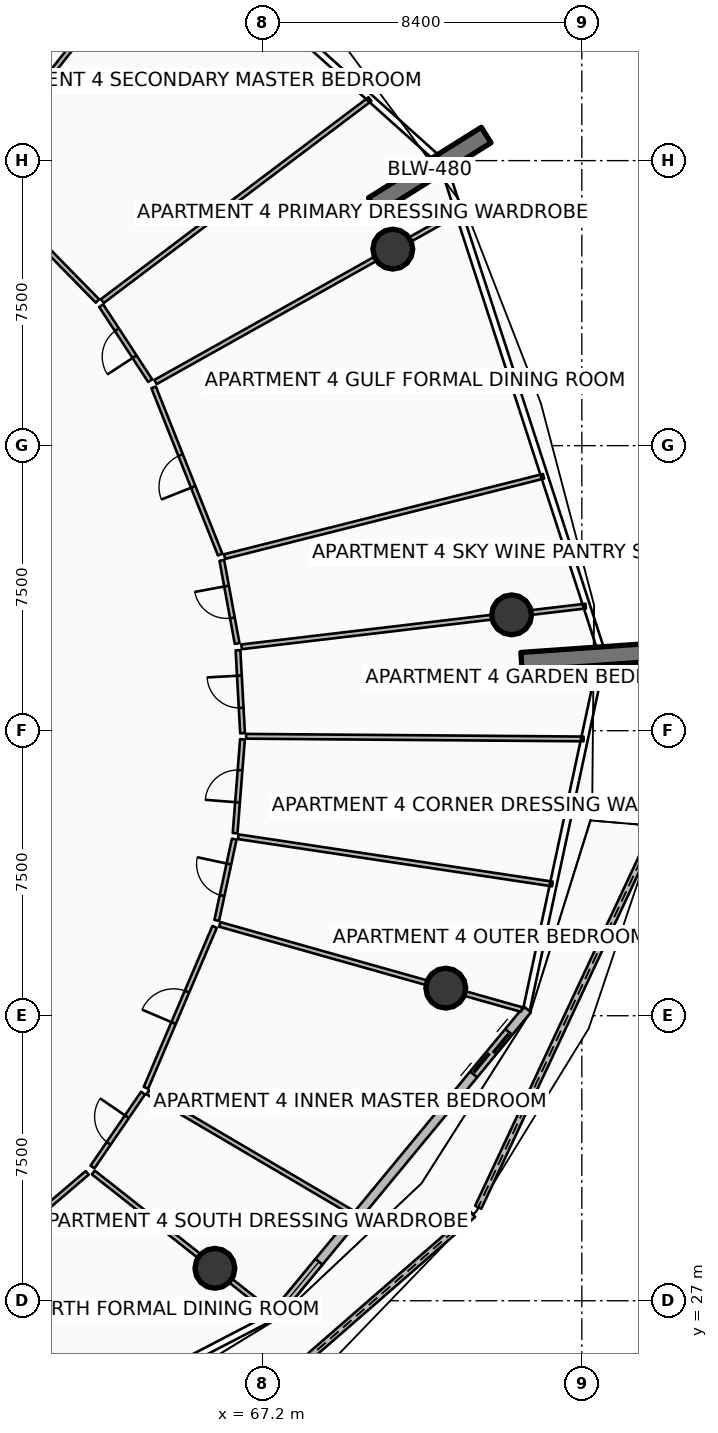
"""IFC4 building model, lengths in metres.
Left out: names, types, materials, properties, quantities, classifications, styles, units other than length and angle.
Written with IfcOpenShell. Run it as: python <this file> out.ifc"""

import sys

from ifc_helpers import new_model, si_unit, direction, frame, frame_2d, origin, origin_2d, place, context, subcontext, project, spatial, polyline, rectangle, circle, outline, extrude, element, fill, save


model = new_model("IFC4")
c1 = context("Model", 3, precision=1e-05, world=origin(), true_north=direction((0.0, 1.0)))
c2 = subcontext(c1, "Body", "Model", "MODEL_VIEW")
j1 = project(units=[si_unit("LENGTHUNIT", "METRE"), si_unit("PLANEANGLEUNIT", "RADIAN")], contexts=[c1])
p1 = place(None, origin())
s1 = spatial("IfcSite", under=j1, at=p1, CompositionType="ELEMENT")
p2 = place(p1, origin())
s2 = spatial("IfcBuilding", under=s1, at=p2, CompositionType="ELEMENT")
p3 = place(p2, frame((0.0, 0.0, 199.05)))
s3 = spatial("IfcBuildingStorey", under=s2, at=p3, CompositionType="ELEMENT", Elevation=199.05)
p4 = place(p3, frame((70.114, 55.818, 0.0), z_axis=(0.0, 0.0, 1.0), x_axis=(0.848033572426, 0.529942506352, 0.0)))
e1 = element("IfcWall", 1, at=p4, inside=s3, PredefinedType="SOLIDWALL", context=c2, shape_type="SweptSolid", body=[
    extrude(rectangle(XDim=3.5, YDim=0.48, at=frame_2d((1.75, 0.0))), origin(), (0.0, 0.0, 1.0), 3.75),
])
p5 = place(p3, frame((74.013, 43.819, 0.0), z_axis=(0.0, 0.0, 1.0), x_axis=(0.997568676264, 0.069690287244, 0.0)))
e2 = element("IfcWall", 2, at=p5, inside=s3, PredefinedType="SOLIDWALL", context=c2, shape_type="SweptSolid", body=[
    extrude(rectangle(XDim=3.5, YDim=0.48, at=frame_2d((1.75, 0.0))), origin(), (0.0, 0.0, 1.0), 3.75),
])
for number, where, z_axis, x_axis in (
    (3, (70.625, 54.671, 0.0), (0.0, 0.0, 1.0), (1.0, 0.0, 0.0)),
    (4, (65.944, 27.854, 0.0), (0.0, 0.0, 1.0), (1.0, 0.0, 0.0)),
    (5, (72.02, 35.226, 0.0), (0.0, 0.0, 1.0), (1.0, 0.0, 0.0)),
    (6, (73.752, 45.048, 0.0), (0.0, 0.0, 1.0), (1.0, 0.0, 0.0)),
):
    element("IfcColumn", number, at=place(p3, frame(where, z_axis=z_axis, x_axis=x_axis)), inside=s3, PredefinedType="COLUMN", context=c2, shape_type="SweptSolid", body=[
        extrude(circle(Radius=0.525, at=origin_2d()), origin(), (0.0, 0.0, 1.0), 3.5),
    ])
p6 = place(p3, frame((64.902, 22.454, 0.0), z_axis=(0.0, 0.0, 1.0), x_axis=(0.754130048188, 0.65672511024, 0.0)))
e7 = element("IfcWall", 7, at=p6, inside=s3, PredefinedType="PARAPET", context=c2, shape_type="SweptSolid", body=[
    extrude(outline(polyline([(0.0, 0.0), (10.384, 0.0), (10.384, 1.148), (5.192, 1.284), (0.0, 1.483), (0.0, 0.0)])), frame((0.0, 0.09, 0.0), z_axis=(0.0, -1.0, 0.0), x_axis=(1.0, 0.0, 0.0)), (0.0, 0.0, 1.0), 0.18),
])
p7 = place(p3, frame((72.874, 29.461, 0.0), z_axis=(0.0, 0.0, 1.0), x_axis=(0.424187068479, 0.90557458607, 0.0)))
e8 = element("IfcWall", 8, at=p7, inside=s3, PredefinedType="PARAPET", context=c2, shape_type="SweptSolid", body=[
    extrude(outline(polyline([(0.0, 0.0), (11.076, 0.0), (11.076, 1.224), (5.538, 1.127), (0.0, 1.148), (0.0, 0.0)])), frame((0.0, 0.09, 0.0), z_axis=(0.0, -1.0, 0.0), x_axis=(1.0, 0.0, 0.0)), (0.0, 0.0, 1.0), 0.18),
])
p8 = place(p3, frame((67.485, 26.576, 0.0), z_axis=(0.0, 0.0, 1.0), x_axis=(0.636759394418, 0.771062561418, 0.0)))
e9 = element("IfcWall", 9, at=p8, inside=s3, PredefinedType="SOLIDWALL", context=c2, shape_type="SweptSolid", body=[
    extrude(rectangle(XDim=10.494, YDim=0.24, at=frame_2d((5.247, 0.0))), origin(), (0.0, 0.0, 1.0), 2.45),
])
p9 = place(p8, frame((8.274, 0.0, 0.0)))
e10 = element("IfcOpeningElement", 10, at=p9, cuts=e9, PredefinedType="OPENING", context=c2, shape_type="SweptSolid", body=[
    extrude(rectangle(XDim=1.45, YDim=2.15, at=frame_2d((0.725, 1.075))), frame((0.0, 0.13, 0.0), z_axis=(0.0, -1.0, 0.0), x_axis=(1.0, 0.0, 0.0)), (0.0, 0.0, 1.0), 0.26),
])
p10 = place(p8, frame((0.28, 0.0, 0.65)))
e11 = element("IfcOpeningElement", 11, at=p10, cuts=e9, PredefinedType="OPENING", context=c2, shape_type="SweptSolid", body=[
    extrude(rectangle(XDim=1.6, YDim=1.5, at=frame_2d((0.8, 0.75))), frame((0.0, 0.13, 0.0), z_axis=(0.0, -1.0, 0.0), x_axis=(1.0, 0.0, 0.0)), (0.0, 0.0, 1.0), 0.26),
])
p11 = place(p3, frame((57.21, 25.776, 0.0), z_axis=(0.0, 0.0, 1.0), x_axis=(0.760406375863, 0.649447567973, 0.0)))
e12 = element("IfcWall", 12, at=p11, inside=s3, PredefinedType="PARTITIONING", context=c2, shape_type="SweptSolid", body=[
    extrude(rectangle(XDim=7.067, YDim=0.125, at=frame_2d((3.534, 0.0))), origin(), (0.0, 0.0, 1.0), 2.94),
])
p12 = place(p11, frame((3.084, 0.0, 0.0)))
e13 = element("IfcOpeningElement", 13, at=p12, cuts=e12, PredefinedType="OPENING", context=c2, shape_type="SweptSolid", body=[
    extrude(rectangle(XDim=0.9, YDim=2.08, at=frame_2d((0.45, 1.04))), frame((0.0, 0.073, 0.0), z_axis=(0.0, -1.0, 0.0), x_axis=(1.0, 0.0, 0.0)), (0.0, 0.0, 1.0), 0.145),
])
p13 = place(p3, frame((62.746, 30.375, 0.0), z_axis=(0.0, 0.0, 1.0), x_axis=(0.785328774221, -0.619078925809, 0.0)))
e14 = element("IfcWall", 14, at=p13, inside=s3, PredefinedType="PARTITIONING", context=c2, shape_type="SweptSolid", body=[
    extrude(rectangle(XDim=6.05, YDim=0.125, at=frame_2d((3.025, 0.0))), origin(), (0.0, 0.0, 1.0), 2.94),
])
p14 = place(p3, frame((64.176, 32.485, 0.0), z_axis=(0.0, 0.0, 1.0), x_axis=(0.861934215158, -0.507020126563, 0.0)))
e15 = element("IfcWall", 15, at=p14, inside=s3, PredefinedType="PARTITIONING", context=c2, shape_type="SweptSolid", body=[
    extrude(rectangle(XDim=6.269, YDim=0.125, at=frame_2d((3.135, 0.0))), origin(), (0.0, 0.0, 1.0), 2.94),
])
p15 = place(p3, frame((62.724, 30.52, 0.0), z_axis=(0.0, 0.0, 1.0), x_axis=(0.564301181705, 0.825569001554, 0.0)))
e16 = element("IfcWall", 16, at=p15, inside=s3, PredefinedType="PARTITIONING", context=c2, shape_type="SweptSolid", body=[
    extrude(rectangle(XDim=2.356, YDim=0.125, at=frame_2d((1.178, 0.0))), origin(), (0.0, 0.0, 1.0), 2.94),
])
p16 = place(p15, frame((0.753, 0.0, 0.0)))
e17 = element("IfcOpeningElement", 17, at=p16, cuts=e16, PredefinedType="OPENING", context=c2, shape_type="SweptSolid", body=[
    extrude(rectangle(XDim=0.85, YDim=2.06, at=frame_2d((0.425, 1.03))), frame((0.0, 0.073, 0.0), z_axis=(0.0, -1.0, 0.0), x_axis=(1.0, 0.0, 0.0)), (0.0, 0.0, 1.0), 0.145),
])
p17 = place(p3, frame((64.13, 32.604, 0.0), z_axis=(0.0, 0.0, 1.0), x_axis=(0.392433899516, 0.919780209893, 0.0)))
e18 = element("IfcWall", 18, at=p17, inside=s3, PredefinedType="PARTITIONING", context=c2, shape_type="SweptSolid", body=[
    extrude(rectangle(XDim=4.604, YDim=0.125, at=frame_2d((2.302, 0.0))), origin(), (0.0, 0.0, 1.0), 2.94),
])
p18 = place(p17, frame((1.852, 0.0, 0.0)))
e19 = element("IfcOpeningElement", 19, at=p18, cuts=e18, PredefinedType="OPENING", context=c2, shape_type="SweptSolid", body=[
    extrude(rectangle(XDim=0.9, YDim=2.08, at=frame_2d((0.45, 1.04))), frame((0.0, 0.073, 0.0), z_axis=(0.0, -1.0, 0.0), x_axis=(1.0, 0.0, 0.0)), (0.0, 0.0, 1.0), 0.145),
])
p19 = place(p3, frame((66.072, 36.903, 0.0), z_axis=(0.0, 0.0, 1.0), x_axis=(0.9624482888, -0.271465083179, 0.0)))
e20 = element("IfcWall", 20, at=p19, inside=s3, PredefinedType="PARTITIONING", context=c2, shape_type="SweptSolid", body=[
    extrude(rectangle(XDim=8.253, YDim=0.125, at=frame_2d((4.126, 0.0))), origin(), (0.0, 0.0, 1.0), 2.94),
])
p20 = place(p3, frame((66.558, 39.21, 0.0), z_axis=(0.0, 0.0, 1.0), x_axis=(0.988887463127, -0.148666019217, 0.0)))
e21 = element("IfcWall", 21, at=p20, inside=s3, PredefinedType="PARTITIONING", context=c2, shape_type="SweptSolid", body=[
    extrude(rectangle(XDim=8.361, YDim=0.125, at=frame_2d((4.18, 0.0))), origin(), (0.0, 0.0, 1.0), 2.94),
])
p21 = place(p3, frame((66.766, 41.853, 0.0), z_axis=(0.0, 0.0, 1.0), x_axis=(0.999969292204, -0.007836749939, 0.0)))
e22 = element("IfcWall", 22, at=p21, inside=s3, PredefinedType="PARTITIONING", context=c2, shape_type="SweptSolid", body=[
    extrude(rectangle(XDim=8.879, YDim=0.125, at=frame_2d((4.439, 0.0))), origin(), (0.0, 0.0, 1.0), 2.94),
])
p22 = place(p3, frame((65.993, 37.009, 0.0), z_axis=(0.0, 0.0, 1.0), x_axis=(0.210467381842, 0.977600880309, 0.0)))
e23 = element("IfcWall", 23, at=p22, inside=s3, PredefinedType="PARTITIONING", context=c2, shape_type="SweptSolid", body=[
    extrude(rectangle(XDim=2.186, YDim=0.125, at=frame_2d((1.093, 0.0))), origin(), (0.0, 0.0, 1.0), 2.94),
])
p23 = place(p22, frame((0.668, 0.0, 0.0)))
e24 = element("IfcOpeningElement", 24, at=p23, cuts=e23, PredefinedType="OPENING", context=c2, shape_type="SweptSolid", body=[
    extrude(rectangle(XDim=0.85, YDim=2.06, at=frame_2d((0.425, 1.03))), frame((0.0, 0.073, 0.0), z_axis=(0.0, -1.0, 0.0), x_axis=(1.0, 0.0, 0.0)), (0.0, 0.0, 1.0), 0.145),
])
p24 = place(p3, frame((66.476, 39.303, 0.0), z_axis=(0.0, 0.0, 1.0), x_axis=(0.078519549514, 0.996912574073, 0.0)))
e25 = element("IfcWall", 25, at=p24, inside=s3, PredefinedType="PARTITIONING", context=c2, shape_type="SweptSolid", body=[
    extrude(rectangle(XDim=2.478, YDim=0.125, at=frame_2d((1.239, 0.0))), origin(), (0.0, 0.0, 1.0), 2.94),
])
p25 = place(p24, frame((0.814, 0.0, 0.0)))
e26 = element("IfcOpeningElement", 26, at=p25, cuts=e25, PredefinedType="OPENING", context=c2, shape_type="SweptSolid", body=[
    extrude(rectangle(XDim=0.85, YDim=2.06, at=frame_2d((0.425, 1.03))), frame((0.0, 0.073, 0.0), z_axis=(0.0, -1.0, 0.0), x_axis=(1.0, 0.0, 0.0)), (0.0, 0.0, 1.0), 0.145),
])
p26 = place(p3, frame((66.672, 41.933, 0.0), z_axis=(0.0, 0.0, 1.0), x_axis=(-0.054962664786, 0.998488410288, 0.0)))
e27 = element("IfcWall", 27, at=p26, inside=s3, PredefinedType="PARTITIONING", context=c2, shape_type="SweptSolid", body=[
    extrude(rectangle(XDim=2.186, YDim=0.125, at=frame_2d((1.093, 0.0))), origin(), (0.0, 0.0, 1.0), 2.94),
])
p27 = place(p26, frame((0.668, 0.0, 0.0)))
e28 = element("IfcOpeningElement", 28, at=p27, cuts=e27, PredefinedType="OPENING", context=c2, shape_type="SweptSolid", body=[
    extrude(rectangle(XDim=0.85, YDim=2.06, at=frame_2d((0.425, 1.03))), frame((0.0, 0.073, 0.0), z_axis=(0.0, -1.0, 0.0), x_axis=(1.0, 0.0, 0.0)), (0.0, 0.0, 1.0), 0.145),
])
p28 = place(p3, frame((66.647, 44.207, 0.0), z_axis=(0.0, 0.0, 1.0), x_axis=(0.993068115644, 0.117540281145, 0.0)))
e29 = element("IfcWall", 29, at=p28, inside=s3, PredefinedType="PARTITIONING", context=c2, shape_type="SweptSolid", body=[
    extrude(rectangle(XDim=9.118, YDim=0.125, at=frame_2d((4.559, 0.0))), origin(), (0.0, 0.0, 1.0), 2.94),
])
p29 = place(p3, frame((66.199, 46.582, 0.0), z_axis=(0.0, 0.0, 1.0), x_axis=(0.969747932206, 0.244108475851, 0.0)))
e30 = element("IfcWall", 30, at=p29, inside=s3, PredefinedType="PARTITIONING", context=c2, shape_type="SweptSolid", body=[
    extrude(rectangle(XDim=8.654, YDim=0.125, at=frame_2d((4.327, 0.0))), origin(), (0.0, 0.0, 1.0), 2.94),
])
p30 = place(p3, frame((66.529, 44.293, 0.0), z_axis=(0.0, 0.0, 1.0), x_axis=(-0.181126107814, 0.983459878728, 0.0)))
e31 = element("IfcWall", 31, at=p30, inside=s3, PredefinedType="PARTITIONING", context=c2, shape_type="SweptSolid", body=[
    extrude(rectangle(XDim=2.224, YDim=0.125, at=frame_2d((1.112, 0.0))), origin(), (0.0, 0.0, 1.0), 2.94),
])
p31 = place(p30, frame((0.687, 0.0, 0.0)))
e32 = element("IfcOpeningElement", 32, at=p31, cuts=e31, PredefinedType="OPENING", context=c2, shape_type="SweptSolid", body=[
    extrude(rectangle(XDim=0.85, YDim=2.06, at=frame_2d((0.425, 1.03))), frame((0.0, 0.073, 0.0), z_axis=(0.0, -1.0, 0.0), x_axis=(1.0, 0.0, 0.0)), (0.0, 0.0, 1.0), 0.145),
])
p32 = place(p3, frame((66.082, 46.634, 0.0), z_axis=(0.0, 0.0, 1.0), x_axis=(-0.369567399645, 0.929203926552, 0.0)))
e33 = element("IfcWall", 33, at=p32, inside=s3, PredefinedType="PARTITIONING", context=c2, shape_type="SweptSolid", body=[
    extrude(rectangle(XDim=4.735, YDim=0.125, at=frame_2d((2.367, 0.0))), origin(), (0.0, 0.0, 1.0), 2.94),
])
p33 = place(p32, frame((1.917, 0.0, 0.0)))
e34 = element("IfcOpeningElement", 34, at=p33, cuts=e33, PredefinedType="OPENING", context=c2, shape_type="SweptSolid", body=[
    extrude(rectangle(XDim=0.9, YDim=2.08, at=frame_2d((0.45, 1.04))), frame((0.0, 0.073, 0.0), z_axis=(0.0, -1.0, 0.0), x_axis=(1.0, 0.0, 0.0)), (0.0, 0.0, 1.0), 0.145),
])
p34 = place(p3, frame((64.383, 51.175, 0.0), z_axis=(0.0, 0.0, 1.0), x_axis=(0.872496427588, 0.488620490611, 0.0)))
e35 = element("IfcWall", 35, at=p34, inside=s3, PredefinedType="PARTITIONING", context=c2, shape_type="SweptSolid", body=[
    extrude(rectangle(XDim=9.118, YDim=0.125, at=frame_2d((4.559, 0.0))), origin(), (0.0, 0.0, 1.0), 2.94),
])
p35 = place(p3, frame((59.625, 56.746, 0.0), z_axis=(0.0, 0.0, 1.0), x_axis=(0.619083134383, 0.785325456561, 0.0)))
e36 = element("IfcWall", 36, at=p35, inside=s3, PredefinedType="PARTITIONING", context=c2, shape_type="SweptSolid", body=[
    extrude(rectangle(XDim=8.353, YDim=0.125, at=frame_2d((4.177, 0.0))), origin(), (0.0, 0.0, 1.0), 2.94),
])
p36 = place(p3, frame((62.981, 53.303, 0.0), z_axis=(0.0, 0.0, 1.0), x_axis=(0.798266473747, 0.602304438711, 0.0)))
e37 = element("IfcWall", 37, at=p36, inside=s3, PredefinedType="PARTITIONING", context=c2, shape_type="SweptSolid", body=[
    extrude(rectangle(XDim=8.822, YDim=0.125, at=frame_2d((4.411, 0.0))), origin(), (0.0, 0.0, 1.0), 2.94),
])
p37 = place(p3, frame((64.241, 51.21, 0.0), z_axis=(0.0, 0.0, 1.0), x_axis=(-0.546782970229, 0.837274377649, 0.0)))
e38 = element("IfcWall", 38, at=p37, inside=s3, PredefinedType="PARTITIONING", context=c2, shape_type="SweptSolid", body=[
    extrude(rectangle(XDim=2.356, YDim=0.125, at=frame_2d((1.178, 0.0))), origin(), (0.0, 0.0, 1.0), 2.94),
])
p38 = place(p37, frame((0.753, 0.0, 0.0)))
e39 = element("IfcOpeningElement", 39, at=p38, cuts=e38, PredefinedType="OPENING", context=c2, shape_type="SweptSolid", body=[
    extrude(rectangle(XDim=0.85, YDim=2.06, at=frame_2d((0.425, 1.03))), frame((0.0, 0.073, 0.0), z_axis=(0.0, -1.0, 0.0), x_axis=(1.0, 0.0, 0.0)), (0.0, 0.0, 1.0), 0.145),
])
p39 = place(p3, frame((62.853, 53.306, 0.0), z_axis=(0.0, 0.0, 1.0), x_axis=(-0.699562743434, 0.714571177699, 0.0)))
e40 = element("IfcWall", 40, at=p39, inside=s3, PredefinedType="PARTITIONING", context=c2, shape_type="SweptSolid", body=[
    extrude(rectangle(XDim=4.604, YDim=0.125, at=frame_2d((2.302, 0.0))), origin(), (0.0, 0.0, 1.0), 2.94),
])
p40 = place(p39, frame((1.852, 0.0, 0.0)))
e41 = element("IfcOpeningElement", 41, at=p40, cuts=e40, PredefinedType="OPENING", context=c2, shape_type="SweptSolid", body=[
    extrude(rectangle(XDim=0.9, YDim=2.08, at=frame_2d((0.45, 1.04))), frame((0.0, 0.073, 0.0), z_axis=(0.0, -1.0, 0.0), x_axis=(1.0, 0.0, 0.0)), (0.0, 0.0, 1.0), 0.145),
])
p41 = place(p9, origin())
e42 = element("IfcDoor", 42, at=p41, inside=s3, OperationType="DOUBLE_DOOR_SLIDING", PredefinedType="DOOR", context=c2, shape_type="SweptSolid", body=[
    extrude(rectangle(XDim=1.45, YDim=2.15, at=frame_2d((0.725, 1.075))), frame((0.0, 0.025, 0.0), z_axis=(0.0, -1.0, 0.0), x_axis=(1.0, 0.0, 0.0)), (0.0, 0.0, 1.0), 0.05),
])
fill(e10, e42)
p42 = place(p10, origin())
e43 = element("IfcWindow", 43, at=p42, inside=s3, PartitioningType="SINGLE_PANEL", PredefinedType="WINDOW", context=c2, shape_type="SweptSolid", body=[
    extrude(rectangle(XDim=1.6, YDim=1.5, at=frame_2d((0.8, 0.75))), frame((0.0, 0.03, 0.0), z_axis=(0.0, -1.0, 0.0), x_axis=(1.0, 0.0, 0.0)), (0.0, 0.0, 1.0), 0.06),
])
fill(e11, e43)
p43 = place(p16, origin())
e44 = element("IfcDoor", 44, at=p43, inside=s3, OperationType="SINGLE_SWING_RIGHT", PredefinedType="DOOR", context=c2, shape_type="SweptSolid", body=[
    extrude(rectangle(XDim=0.85, YDim=2.06, at=frame_2d((0.425, 1.03))), frame((0.0, 0.025, 0.0), z_axis=(0.0, -1.0, 0.0), x_axis=(1.0, 0.0, 0.0)), (0.0, 0.0, 1.0), 0.05),
])
fill(e17, e44)
p44 = place(p18, origin())
e45 = element("IfcDoor", 45, at=p44, inside=s3, OperationType="SINGLE_SWING_LEFT", PredefinedType="DOOR", context=c2, shape_type="SweptSolid", body=[
    extrude(rectangle(XDim=0.9, YDim=2.08, at=frame_2d((0.45, 1.04))), frame((0.0, 0.025, 0.0), z_axis=(0.0, -1.0, 0.0), x_axis=(1.0, 0.0, 0.0)), (0.0, 0.0, 1.0), 0.05),
])
fill(e19, e45)
p45 = place(p23, origin())
e46 = element("IfcDoor", 46, at=p45, inside=s3, OperationType="SINGLE_SWING_RIGHT", PredefinedType="DOOR", context=c2, shape_type="SweptSolid", body=[
    extrude(rectangle(XDim=0.85, YDim=2.06, at=frame_2d((0.425, 1.03))), frame((0.0, 0.025, 0.0), z_axis=(0.0, -1.0, 0.0), x_axis=(1.0, 0.0, 0.0)), (0.0, 0.0, 1.0), 0.05),
])
fill(e24, e46)
p46 = place(p25, origin())
e47 = element("IfcDoor", 47, at=p46, inside=s3, OperationType="SINGLE_SWING_LEFT", PredefinedType="DOOR", context=c2, shape_type="SweptSolid", body=[
    extrude(rectangle(XDim=0.85, YDim=2.06, at=frame_2d((0.425, 1.03))), frame((0.0, 0.025, 0.0), z_axis=(0.0, -1.0, 0.0), x_axis=(1.0, 0.0, 0.0)), (0.0, 0.0, 1.0), 0.05),
])
fill(e26, e47)
p47 = place(p27, origin())
e48 = element("IfcDoor", 48, at=p47, inside=s3, OperationType="SINGLE_SWING_RIGHT", PredefinedType="DOOR", context=c2, shape_type="SweptSolid", body=[
    extrude(rectangle(XDim=0.85, YDim=2.06, at=frame_2d((0.425, 1.03))), frame((0.0, 0.025, 0.0), z_axis=(0.0, -1.0, 0.0), x_axis=(1.0, 0.0, 0.0)), (0.0, 0.0, 1.0), 0.05),
])
fill(e28, e48)
p48 = place(p31, origin())
e49 = element("IfcDoor", 49, at=p48, inside=s3, OperationType="SINGLE_SWING_RIGHT", PredefinedType="DOOR", context=c2, shape_type="SweptSolid", body=[
    extrude(rectangle(XDim=0.85, YDim=2.06, at=frame_2d((0.425, 1.03))), frame((0.0, 0.025, 0.0), z_axis=(0.0, -1.0, 0.0), x_axis=(1.0, 0.0, 0.0)), (0.0, 0.0, 1.0), 0.05),
])
fill(e32, e49)
p49 = place(p33, origin())
e50 = element("IfcDoor", 50, at=p49, inside=s3, OperationType="SINGLE_SWING_LEFT", PredefinedType="DOOR", context=c2, shape_type="SweptSolid", body=[
    extrude(rectangle(XDim=0.9, YDim=2.08, at=frame_2d((0.45, 1.04))), frame((0.0, 0.025, 0.0), z_axis=(0.0, -1.0, 0.0), x_axis=(1.0, 0.0, 0.0)), (0.0, 0.0, 1.0), 0.05),
])
fill(e34, e50)
p50 = place(p38, origin())
e51 = element("IfcDoor", 51, at=p50, inside=s3, OperationType="SINGLE_SWING_LEFT", PredefinedType="DOOR", context=c2, shape_type="SweptSolid", body=[
    extrude(rectangle(XDim=0.85, YDim=2.06, at=frame_2d((0.425, 1.03))), frame((0.0, 0.025, 0.0), z_axis=(0.0, -1.0, 0.0), x_axis=(1.0, 0.0, 0.0)), (0.0, 0.0, 1.0), 0.05),
])
fill(e39, e51)
save(model, sys.argv[1])
